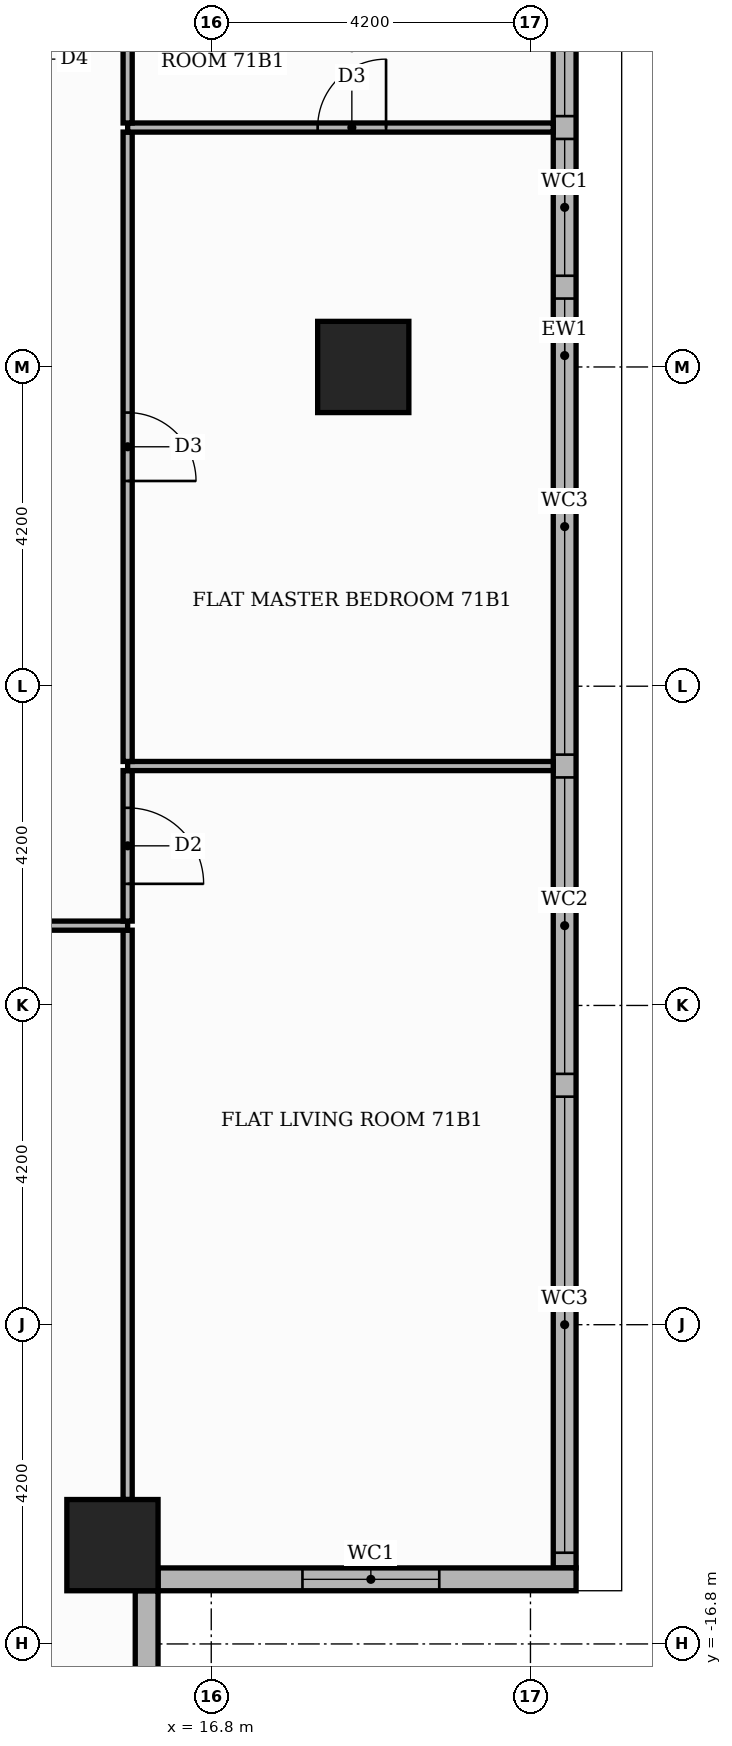
"""IFC4 building model, lengths in metres.
Left out: names, types, materials, properties, quantities, classifications, styles, units other than length and angle.
Written with IfcOpenShell. Run it as: python <this file> out.ifc"""

import sys

from ifc_helpers import new_model, si_unit, direction, frame, frame_2d, origin, origin_2d, place, context, subcontext, project, spatial, rectangle, extrude, element, fill, save


model = new_model("IFC4")
c1 = context("Model", 3, precision=1e-05, world=origin(), true_north=direction((0.0, 1.0)))
c2 = subcontext(c1, "Body", "Model", "MODEL_VIEW")
j1 = project(units=[si_unit("LENGTHUNIT", "METRE"), si_unit("PLANEANGLEUNIT", "RADIAN")], contexts=[c1])
p1 = place(None, origin())
s1 = spatial("IfcSite", under=j1, at=p1, CompositionType="ELEMENT")
p2 = place(p1, origin())
s2 = spatial("IfcBuilding", under=s1, at=p2, CompositionType="ELEMENT")
p3 = place(p2, frame((0.0, 0.0, 296.7)))
s3 = spatial("IfcBuildingStorey", under=s2, at=p3, CompositionType="ELEMENT", Elevation=296.7)
for number, where, z_axis, x_axis in (
    (1, (18.8, 0.0, 0.0), (0.0, 0.0, 1.0), (1.0, 0.0, 0.0)),
    (2, (15.5, -15.5, 0.0), (0.0, 0.0, 1.0), (1.0, 0.0, 0.0)),
):
    element("IfcColumn", number, at=place(p3, frame(where, z_axis=z_axis, x_axis=x_axis)), inside=s3, PredefinedType="COLUMN", context=c2, shape_type="SweptSolid", body=[
        extrude(rectangle(XDim=1.2, YDim=1.2, at=origin_2d()), origin(), (0.0, 0.0, 1.0), 3.9),
    ])
p4 = place(p3, frame((21.45, -15.8, 0.0), z_axis=(0.0, 0.0, 1.0), x_axis=(0.0, 1.0, 0.0)))
e3 = element("IfcWall", 3, at=p4, inside=s3, PredefinedType="STANDARD", context=c2, shape_type="SweptSolid", body=[
    extrude(rectangle(XDim=31.9, YDim=0.3, at=frame_2d((15.95, 0.0))), origin(), (0.0, 0.0, 1.0), 3.55),
])
p5 = place(p4, frame((0.2, 0.0, 0.6)))
e4 = element("IfcOpeningElement", 4, at=p5, cuts=e3, PredefinedType="OPENING", context=c2, shape_type="SweptSolid", body=[
    extrude(rectangle(XDim=6.0, YDim=2.4, at=frame_2d((3.0, 1.2))), frame((0.0, 0.16, 0.0), z_axis=(0.0, -1.0, 0.0), x_axis=(1.0, 0.0, 0.0)), (0.0, 0.0, 1.0), 0.32),
])
p6 = place(p4, frame((6.5, 0.0, 0.6)))
e5 = element("IfcOpeningElement", 5, at=p6, cuts=e3, PredefinedType="OPENING", context=c2, shape_type="SweptSolid", body=[
    extrude(rectangle(XDim=3.9, YDim=2.4, at=frame_2d((1.95, 1.2))), frame((0.0, 0.16, 0.0), z_axis=(0.0, -1.0, 0.0), x_axis=(1.0, 0.0, 0.0)), (0.0, 0.0, 1.0), 0.32),
])
p7 = place(p4, frame((10.7, 0.0, 0.6)))
e6 = element("IfcOpeningElement", 6, at=p7, cuts=e3, PredefinedType="OPENING", context=c2, shape_type="SweptSolid", body=[
    extrude(rectangle(XDim=6.0, YDim=2.4, at=frame_2d((3.0, 1.2))), frame((0.0, 0.16, 0.0), z_axis=(0.0, -1.0, 0.0), x_axis=(1.0, 0.0, 0.0)), (0.0, 0.0, 1.0), 0.32),
])
p8 = place(p4, frame((17.0, 0.0, 0.6)))
e7 = element("IfcOpeningElement", 7, at=p8, cuts=e3, PredefinedType="OPENING", context=c2, shape_type="SweptSolid", body=[
    extrude(rectangle(XDim=1.8, YDim=2.4, at=frame_2d((0.9, 1.2))), frame((0.0, 0.16, 0.0), z_axis=(0.0, -1.0, 0.0), x_axis=(1.0, 0.0, 0.0)), (0.0, 0.0, 1.0), 0.32),
])
p9 = place(p4, frame((19.1, 0.0, 0.6)))
e8 = element("IfcOpeningElement", 8, at=p9, cuts=e3, PredefinedType="OPENING", context=c2, shape_type="SweptSolid", body=[
    extrude(rectangle(XDim=1.8, YDim=2.4, at=frame_2d((0.9, 1.2))), frame((0.0, 0.16, 0.0), z_axis=(0.0, -1.0, 0.0), x_axis=(1.0, 0.0, 0.0)), (0.0, 0.0, 1.0), 0.32),
])
p10 = place(p4, frame((21.2, 0.0, 0.6)))
e9 = element("IfcOpeningElement", 9, at=p10, cuts=e3, PredefinedType="OPENING", context=c2, shape_type="SweptSolid", body=[
    extrude(rectangle(XDim=1.8, YDim=2.4, at=frame_2d((0.9, 1.2))), frame((0.0, 0.16, 0.0), z_axis=(0.0, -1.0, 0.0), x_axis=(1.0, 0.0, 0.0)), (0.0, 0.0, 1.0), 0.32),
])
p11 = place(p4, frame((23.3, 0.0, 0.6)))
e10 = element("IfcOpeningElement", 10, at=p11, cuts=e3, PredefinedType="OPENING", context=c2, shape_type="SweptSolid", body=[
    extrude(rectangle(XDim=6.0, YDim=2.4, at=frame_2d((3.0, 1.2))), frame((0.0, 0.16, 0.0), z_axis=(0.0, -1.0, 0.0), x_axis=(1.0, 0.0, 0.0)), (0.0, 0.0, 1.0), 0.32),
])
p12 = place(p4, frame((29.6, 0.0, 0.6)))
e11 = element("IfcOpeningElement", 11, at=p12, cuts=e3, PredefinedType="OPENING", context=c2, shape_type="SweptSolid", body=[
    extrude(rectangle(XDim=1.8, YDim=2.4, at=frame_2d((0.9, 1.2))), frame((0.0, 0.16, 0.0), z_axis=(0.0, -1.0, 0.0), x_axis=(1.0, 0.0, 0.0)), (0.0, 0.0, 1.0), 0.32),
])
p13 = place(p3, frame((15.95, -21.3, 0.0), z_axis=(0.0, 0.0, 1.0), x_axis=(0.0, 1.0, 0.0)))
e12 = element("IfcWall", 12, at=p13, inside=s3, PredefinedType="STANDARD", context=c2, shape_type="SweptSolid", body=[
    extrude(rectangle(XDim=5.2, YDim=0.3, at=frame_2d((2.6, 0.0))), origin(), (0.0, 0.0, 1.0), 3.55),
])
p14 = place(p13, frame((1.5, 0.0, 0.6)))
e13 = element("IfcOpeningElement", 13, at=p14, cuts=e12, PredefinedType="OPENING", context=c2, shape_type="SweptSolid", body=[
    extrude(rectangle(XDim=1.8, YDim=2.4, at=frame_2d((0.9, 1.2))), frame((0.0, 0.16, 0.0), z_axis=(0.0, -1.0, 0.0), x_axis=(1.0, 0.0, 0.0)), (0.0, 0.0, 1.0), 0.32),
])
p15 = place(p3, frame((16.1, -15.95, 0.0), z_axis=(0.0, 0.0, 1.0), x_axis=(1.0, 0.0, 0.0)))
e14 = element("IfcWall", 14, at=p15, inside=s3, PredefinedType="STANDARD", context=c2, shape_type="SweptSolid", body=[
    extrude(rectangle(XDim=5.5, YDim=0.3, at=frame_2d((2.75, 0.0))), origin(), (0.0, 0.0, 1.0), 3.55),
])
p16 = place(p15, frame((1.9, 0.0, 0.6)))
e15 = element("IfcOpeningElement", 15, at=p16, cuts=e14, PredefinedType="OPENING", context=c2, shape_type="SweptSolid", body=[
    extrude(rectangle(XDim=1.8, YDim=2.4, at=frame_2d((0.9, 1.2))), frame((0.0, 0.16, 0.0), z_axis=(0.0, -1.0, 0.0), x_axis=(1.0, 0.0, 0.0)), (0.0, 0.0, 1.0), 0.32),
])
p17 = place(p3, frame((15.7, -14.9, 0.0), z_axis=(0.0, 0.0, 1.0), x_axis=(0.0, 1.0, 0.0)))
e16 = element("IfcWall", 16, at=p17, inside=s3, PredefinedType="PARTITIONING", context=c2, shape_type="SweptSolid", body=[
    extrude(rectangle(XDim=7.49, YDim=0.12, at=frame_2d((3.745, 0.0))), origin(), (0.0, 0.0, 1.0), 3.55),
])
p18 = place(p3, frame((7.35, -7.35, 0.0), z_axis=(0.0, 0.0, 1.0), x_axis=(1.0, 0.0, 0.0)))
e17 = element("IfcWall", 17, at=p18, inside=s3, PredefinedType="PARTITIONING", context=c2, shape_type="SweptSolid", body=[
    extrude(rectangle(XDim=8.35, YDim=0.12, at=frame_2d((4.175, 0.0))), origin(), (0.0, 0.0, 1.0), 3.55),
])
p19 = place(p18, frame((3.725, 0.0, 0.0)))
e18 = element("IfcOpeningElement", 18, at=p19, cuts=e17, PredefinedType="OPENING", context=c2, shape_type="SweptSolid", body=[
    extrude(rectangle(XDim=0.9, YDim=2.1, at=frame_2d((0.45, 1.05))), frame((0.0, 0.07, 0.0), z_axis=(0.0, -1.0, 0.0), x_axis=(1.0, 0.0, 0.0)), (0.0, 0.0, 1.0), 0.14),
])
p20 = place(p3, frame((15.7, -7.29, 0.0), z_axis=(0.0, 0.0, 1.0), x_axis=(0.0, 1.0, 0.0)))
e19 = element("IfcWall", 19, at=p20, inside=s3, PredefinedType="PARTITIONING", context=c2, shape_type="SweptSolid", body=[
    extrude(rectangle(XDim=1.98, YDim=0.12, at=frame_2d((0.99, 0.0))), origin(), (0.0, 0.0, 1.0), 3.55),
])
p21 = place(p20, frame((0.49, 0.0, 0.0)))
e20 = element("IfcOpeningElement", 20, at=p21, cuts=e19, PredefinedType="OPENING", context=c2, shape_type="SweptSolid", body=[
    extrude(rectangle(XDim=1.0, YDim=2.1, at=frame_2d((0.5, 1.05))), frame((0.0, 0.07, 0.0), z_axis=(0.0, -1.0, 0.0), x_axis=(1.0, 0.0, 0.0)), (0.0, 0.0, 1.0), 0.14),
])
p22 = place(p3, frame((15.7, -5.25, 0.0), z_axis=(0.0, 0.0, 1.0), x_axis=(1.0, 0.0, 0.0)))
e21 = element("IfcWall", 21, at=p22, inside=s3, PredefinedType="PARTITIONING", context=c2, shape_type="SweptSolid", body=[
    extrude(rectangle(XDim=5.6, YDim=0.12, at=frame_2d((2.8, 0.0))), origin(), (0.0, 0.0, 1.0), 3.55),
])
p23 = place(p3, frame((15.7, -5.19, 0.0), z_axis=(0.0, 0.0, 1.0), x_axis=(0.0, 1.0, 0.0)))
e22 = element("IfcWall", 22, at=p23, inside=s3, PredefinedType="PARTITIONING", context=c2, shape_type="SweptSolid", body=[
    extrude(rectangle(XDim=8.28, YDim=0.12, at=frame_2d((4.14, 0.0))), origin(), (0.0, 0.0, 1.0), 3.55),
])
p24 = place(p23, frame((3.69, 0.0, 0.0)))
e23 = element("IfcOpeningElement", 23, at=p24, cuts=e22, PredefinedType="OPENING", context=c2, shape_type="SweptSolid", body=[
    extrude(rectangle(XDim=0.9, YDim=2.1, at=frame_2d((0.45, 1.05))), frame((0.0, 0.07, 0.0), z_axis=(0.0, -1.0, 0.0), x_axis=(1.0, 0.0, 0.0)), (0.0, 0.0, 1.0), 0.14),
])
p25 = place(p3, frame((15.7, 3.15, 0.0), z_axis=(0.0, 0.0, 1.0), x_axis=(1.0, 0.0, 0.0)))
e24 = element("IfcWall", 24, at=p25, inside=s3, PredefinedType="PARTITIONING", context=c2, shape_type="SweptSolid", body=[
    extrude(rectangle(XDim=5.6, YDim=0.12, at=frame_2d((2.8, 0.0))), origin(), (0.0, 0.0, 1.0), 3.55),
])
p26 = place(p25, frame((2.5, 0.0, 0.0)))
e25 = element("IfcOpeningElement", 25, at=p26, cuts=e24, PredefinedType="OPENING", context=c2, shape_type="SweptSolid", body=[
    extrude(rectangle(XDim=0.9, YDim=2.1, at=frame_2d((0.45, 1.05))), frame((0.0, 0.07, 0.0), z_axis=(0.0, -1.0, 0.0), x_axis=(1.0, 0.0, 0.0)), (0.0, 0.0, 1.0), 0.14),
])
p27 = place(p3, frame((15.7, 3.21, 0.0), z_axis=(0.0, 0.0, 1.0), x_axis=(0.0, 1.0, 0.0)))
e26 = element("IfcWall", 26, at=p27, inside=s3, PredefinedType="PARTITIONING", context=c2, shape_type="SweptSolid", body=[
    extrude(rectangle(XDim=1.98, YDim=0.12, at=frame_2d((0.99, 0.0))), origin(), (0.0, 0.0, 1.0), 3.55),
])
p28 = place(p5, origin())
e27 = element("IfcWindow", 27, at=p28, inside=s3, PartitioningType="SINGLE_PANEL", PredefinedType="WINDOW", context=c2, shape_type="SweptSolid", body=[
    extrude(rectangle(XDim=6.0, YDim=2.4, at=frame_2d((3.0, 1.2))), frame((0.0, 0.03, 0.0), z_axis=(0.0, -1.0, 0.0), x_axis=(1.0, 0.0, 0.0)), (0.0, 0.0, 1.0), 0.06),
])
fill(e4, e27)
p29 = place(p6, origin())
e28 = element("IfcWindow", 28, at=p29, inside=s3, PartitioningType="SINGLE_PANEL", PredefinedType="WINDOW", context=c2, shape_type="SweptSolid", body=[
    extrude(rectangle(XDim=3.9, YDim=2.4, at=frame_2d((1.95, 1.2))), frame((0.0, 0.03, 0.0), z_axis=(0.0, -1.0, 0.0), x_axis=(1.0, 0.0, 0.0)), (0.0, 0.0, 1.0), 0.06),
])
fill(e5, e28)
p30 = place(p7, origin())
e29 = element("IfcWindow", 29, at=p30, inside=s3, PartitioningType="SINGLE_PANEL", PredefinedType="WINDOW", context=c2, shape_type="SweptSolid", body=[
    extrude(rectangle(XDim=6.0, YDim=2.4, at=frame_2d((3.0, 1.2))), frame((0.0, 0.03, 0.0), z_axis=(0.0, -1.0, 0.0), x_axis=(1.0, 0.0, 0.0)), (0.0, 0.0, 1.0), 0.06),
])
fill(e6, e29)
p31 = place(p8, origin())
e30 = element("IfcWindow", 30, at=p31, inside=s3, PartitioningType="SINGLE_PANEL", PredefinedType="WINDOW", context=c2, shape_type="SweptSolid", body=[
    extrude(rectangle(XDim=1.8, YDim=2.4, at=frame_2d((0.9, 1.2))), frame((0.0, 0.03, 0.0), z_axis=(0.0, -1.0, 0.0), x_axis=(1.0, 0.0, 0.0)), (0.0, 0.0, 1.0), 0.06),
])
fill(e7, e30)
p32 = place(p9, origin())
e31 = element("IfcWindow", 31, at=p32, inside=s3, PartitioningType="SINGLE_PANEL", PredefinedType="WINDOW", context=c2, shape_type="SweptSolid", body=[
    extrude(rectangle(XDim=1.8, YDim=2.4, at=frame_2d((0.9, 1.2))), frame((0.0, 0.03, 0.0), z_axis=(0.0, -1.0, 0.0), x_axis=(1.0, 0.0, 0.0)), (0.0, 0.0, 1.0), 0.06),
])
fill(e8, e31)
p33 = place(p16, origin())
e32 = element("IfcWindow", 32, at=p33, inside=s3, PartitioningType="SINGLE_PANEL", PredefinedType="WINDOW", context=c2, shape_type="SweptSolid", body=[
    extrude(rectangle(XDim=1.8, YDim=2.4, at=frame_2d((0.9, 1.2))), frame((0.0, 0.03, 0.0), z_axis=(0.0, -1.0, 0.0), x_axis=(1.0, 0.0, 0.0)), (0.0, 0.0, 1.0), 0.06),
])
fill(e15, e32)
p34 = place(p21, frame((1.0, 0.0, 0.0), z_axis=(0.0, 0.0, 1.0), x_axis=(-1.0, 0.0, 0.0)))
e33 = element("IfcDoor", 33, at=p34, inside=s3, OperationType="SINGLE_SWING_LEFT", PredefinedType="DOOR", context=c2, shape_type="SweptSolid", body=[
    extrude(rectangle(XDim=1.0, YDim=2.1, at=frame_2d((0.5, 1.05))), frame((0.0, 0.025, 0.0), z_axis=(0.0, -1.0, 0.0), x_axis=(1.0, 0.0, 0.0)), (0.0, 0.0, 1.0), 0.05),
])
fill(e20, e33)
p35 = place(p24, frame((0.9, 0.0, 0.0), z_axis=(0.0, 0.0, 1.0), x_axis=(-1.0, 0.0, 0.0)))
e34 = element("IfcDoor", 34, at=p35, inside=s3, OperationType="SINGLE_SWING_LEFT", PredefinedType="DOOR", context=c2, shape_type="SweptSolid", body=[
    extrude(rectangle(XDim=0.9, YDim=2.1, at=frame_2d((0.45, 1.05))), frame((0.0, 0.025, 0.0), z_axis=(0.0, -1.0, 0.0), x_axis=(1.0, 0.0, 0.0)), (0.0, 0.0, 1.0), 0.05),
])
fill(e23, e34)
p36 = place(p26, origin())
e35 = element("IfcDoor", 35, at=p36, inside=s3, OperationType="SINGLE_SWING_RIGHT", PredefinedType="DOOR", context=c2, shape_type="SweptSolid", body=[
    extrude(rectangle(XDim=0.9, YDim=2.1, at=frame_2d((0.45, 1.05))), frame((0.0, 0.025, 0.0), z_axis=(0.0, -1.0, 0.0), x_axis=(1.0, 0.0, 0.0)), (0.0, 0.0, 1.0), 0.05),
])
fill(e25, e35)
save(model, sys.argv[1])
